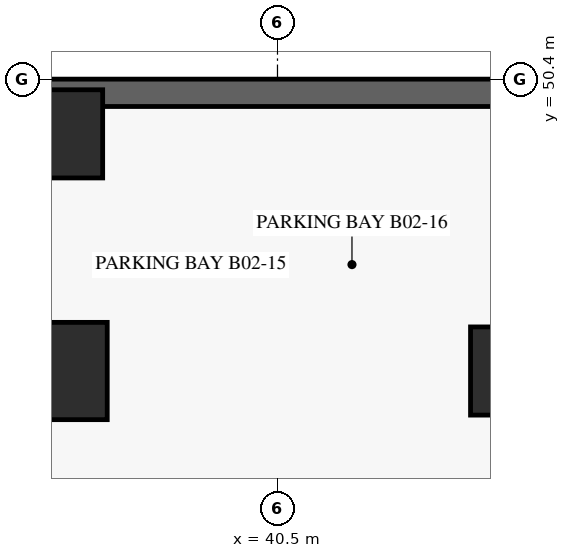
"""IFC4 building model, lengths in metres.
Left out: names, types, materials, properties, quantities, classifications, styles, units other than length and angle.
Written with IfcOpenShell. Run it as: python <this file> out.ifc"""

import sys

from ifc_helpers import new_model, si_unit, direction, frame, frame_2d, origin, origin_2d, place, context, subcontext, project, spatial, rectangle, extrude, source, transform, mapped, element, save


model = new_model("IFC4")
c1 = context("Model", 3, precision=1e-05, world=origin(), true_north=direction((0.0, 1.0)))
c2 = subcontext(c1, "Body", "Model", "MODEL_VIEW")
j1 = project(units=[si_unit("LENGTHUNIT", "METRE"), si_unit("PLANEANGLEUNIT", "RADIAN")], contexts=[c1])
p1 = place(None, origin())
s1 = spatial("IfcSite", under=j1, at=p1, CompositionType="ELEMENT")
p2 = place(p1, origin())
s2 = spatial("IfcBuilding", under=s1, at=p2, CompositionType="ELEMENT")
p3 = place(p2, frame((0.0, 0.0, -7.2)))
s3 = spatial("IfcBuildingStorey", under=s2, at=p3, CompositionType="ELEMENT", Elevation=-7.2)
p4 = place(p3, frame((64.575, 50.175, -0.36), z_axis=(0.0, 0.0, 1.0), x_axis=(-1.0, 0.0, 0.0)))
e1 = element("IfcWall", 1, at=p4, inside=s3, PredefinedType="USERDEFINED", context=c2, shape_type="SweptSolid", body=[
    extrude(rectangle(XDim=64.35, YDim=0.45, at=frame_2d((32.175, 0.0))), origin(), (0.0, 0.0, 1.0), 3.598),
])
m1 = source(origin(), c2, "Body", "SweptSolid", [
    extrude(rectangle(XDim=1.6, YDim=1.6, at=origin_2d()), origin(), (0.0, 0.0, 1.0), 3.6),
])
p5 = place(p3, frame((36.9, 45.6, -0.36), z_axis=(0.0, 0.0, 1.0), x_axis=(1.0, 0.0, 0.0)))
e2 = element("IfcColumn", 2, at=p5, inside=s3, PredefinedType="COLUMN", context=c2, shape_type="MappedRepresentation", body=[
    mapped(m1, transform((0.0, 0.0, 0.0), scale=1.0)),
])
m2 = source(origin(), c2, "Body", "SweptSolid", [
    extrude(rectangle(XDim=1.45, YDim=1.45, at=origin_2d()), origin(), (0.0, 0.0, 1.0), 3.6),
])
for number, where, z_axis, x_axis in (
    (3, (44.4, 45.6, -0.36), (0.0, 0.0, 1.0), (1.0, 0.0, 0.0)),
    (4, (36.9, 49.5, -0.36), (0.0, 0.0, 1.0), (1.0, 0.0, 0.0)),
):
    element("IfcColumn", number, at=place(p3, frame(where, z_axis=z_axis, x_axis=x_axis)), inside=s3, PredefinedType="COLUMN", context=c2, shape_type="MappedRepresentation", body=[
        mapped(m2, transform((0.0, 0.0, 0.0), scale=1.0)),
    ])
save(model, sys.argv[1])
